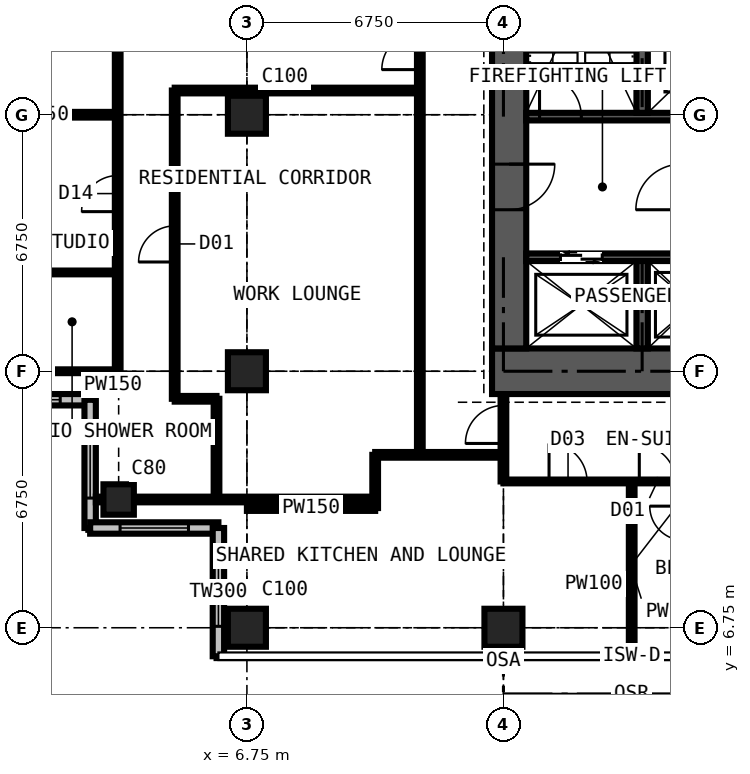
"""IFC4 building model, lengths in metres.
Left out: names, types, materials, properties, quantities, classifications, styles, units other than length and angle.
Written with IfcOpenShell. Run it as: python <this file> out.ifc"""

import sys

from ifc_helpers import new_model, si_unit, direction, frame, frame_2d, origin, origin_2d, place, context, subcontext, project, spatial, rectangle, extrude, element, fill, save


model = new_model("IFC4")
c1 = context("Model", 3, precision=1e-05, world=origin(), true_north=direction((0.0, 1.0)))
c2 = subcontext(c1, "Body", "Model", "MODEL_VIEW")
j1 = project(units=[si_unit("LENGTHUNIT", "METRE"), si_unit("PLANEANGLEUNIT", "RADIAN")], contexts=[c1])
p1 = place(None, origin())
s1 = spatial("IfcSite", under=j1, at=p1, CompositionType="ELEMENT")
p2 = place(p1, origin())
s2 = spatial("IfcBuilding", under=s1, at=p2, CompositionType="ELEMENT")
p3 = place(p2, frame((0.0, 0.0, 236.7)))
s3 = spatial("IfcBuildingStorey", under=s2, at=p3, CompositionType="ELEMENT", Elevation=236.7)
p4 = place(p3, frame((3.375, 10.125, 0.0), z_axis=(0.0, 0.0, 1.0), x_axis=(1.0, 0.0, 0.0)))
e1 = element("IfcColumn", 1, at=p4, inside=s3, PredefinedType="COLUMN", context=c2, shape_type="SweptSolid", body=[
    extrude(rectangle(XDim=0.8, YDim=0.8, at=origin_2d()), origin(), (0.0, 0.0, 1.0), 3.6),
])
for number, where, z_axis, x_axis in (
    (2, (6.75, 6.75, 0.0), (0.0, 0.0, 1.0), (1.0, 0.0, 0.0)),
    (3, (6.75, 13.5, 0.0), (0.0, 0.0, 1.0), (1.0, 0.0, 0.0)),
    (4, (6.75, 20.25, 0.0), (0.0, 0.0, 1.0), (1.0, 0.0, 0.0)),
    (5, (13.5, 6.75, 0.0), (0.0, 0.0, 1.0), (1.0, 0.0, 0.0)),
):
    element("IfcColumn", number, at=place(p3, frame(where, z_axis=z_axis, x_axis=x_axis)), inside=s3, PredefinedType="COLUMN", context=c2, shape_type="SweptSolid", body=[
        extrude(rectangle(XDim=1.0, YDim=1.0, at=origin_2d()), origin(), (0.0, 0.0, 1.0), 3.6),
    ])
p5 = place(p3, frame((13.2, 13.5, 0.0), z_axis=(0.0, 0.0, 1.0), x_axis=(1.0, 0.0, 0.0)))
e6 = element("IfcWall", 6, at=p5, inside=s3, PredefinedType="SHEAR", context=c2, shape_type="SweptSolid", body=[
    extrude(rectangle(XDim=14.1, YDim=1.2, at=frame_2d((7.05, 0.0))), origin(), (0.0, 0.0, 1.0), 3.6),
])
p6 = place(p3, frame((13.65, 26.4, 0.0), z_axis=(0.0, 0.0, 1.0), x_axis=(0.0, -1.0, 0.0)))
e7 = element("IfcWall", 7, at=p6, inside=s3, PredefinedType="SHEAR", context=c2, shape_type="SweptSolid", body=[
    extrude(rectangle(XDim=12.3, YDim=0.9, at=frame_2d((6.15, 0.0))), origin(), (0.0, 0.0, 1.0), 3.6),
])
p7 = place(p6, frame((7.45, 0.0, 0.0)))
e8 = element("IfcOpeningElement", 8, at=p7, cuts=e7, PredefinedType="OPENING", context=c2, shape_type="SweptSolid", body=[
    extrude(rectangle(XDim=1.2, YDim=2.2, at=frame_2d((0.6, 1.1))), frame((0.0, 0.46, 0.0), z_axis=(0.0, -1.0, 0.0), x_axis=(1.0, 0.0, 0.0)), (0.0, 0.0, 1.0), 0.92),
])
p8 = place(p3, frame((-0.75, 12.75, 0.0), z_axis=(0.0, 0.0, 1.0), x_axis=(1.0, 0.0, 0.0)))
e9 = element("IfcWall", 9, at=p8, inside=s3, PredefinedType="SOLIDWALL", context=c2, shape_type="SweptSolid", body=[
    extrude(rectangle(XDim=3.375, YDim=0.3, at=frame_2d((1.688, 0.0))), origin(), (0.0, 0.0, 1.0), 3.375),
])
p9 = place(p8, frame((0.788, 0.0, 0.6)))
e10 = element("IfcOpeningElement", 10, at=p9, cuts=e9, PredefinedType="OPENING", context=c2, shape_type="SweptSolid", body=[
    extrude(rectangle(XDim=1.8, YDim=2.1, at=frame_2d((0.9, 1.05))), frame((0.0, 0.16, 0.0), z_axis=(0.0, -1.0, 0.0), x_axis=(1.0, 0.0, 0.0)), (0.0, 0.0, 1.0), 0.32),
])
p10 = place(p3, frame((2.625, 12.75, 0.0), z_axis=(0.0, 0.0, 1.0), x_axis=(0.0, -1.0, 0.0)))
e11 = element("IfcWall", 11, at=p10, inside=s3, PredefinedType="SOLIDWALL", context=c2, shape_type="SweptSolid", body=[
    extrude(rectangle(XDim=3.375, YDim=0.3, at=frame_2d((1.688, 0.0))), origin(), (0.0, 0.0, 1.0), 3.375),
])
p11 = place(p10, frame((0.788, 0.0, 0.6)))
e12 = element("IfcOpeningElement", 12, at=p11, cuts=e11, PredefinedType="OPENING", context=c2, shape_type="SweptSolid", body=[
    extrude(rectangle(XDim=1.8, YDim=2.1, at=frame_2d((0.9, 1.05))), frame((0.0, 0.16, 0.0), z_axis=(0.0, -1.0, 0.0), x_axis=(1.0, 0.0, 0.0)), (0.0, 0.0, 1.0), 0.32),
])
p12 = place(p3, frame((2.625, 9.375, 0.0), z_axis=(0.0, 0.0, 1.0), x_axis=(1.0, 0.0, 0.0)))
e13 = element("IfcWall", 13, at=p12, inside=s3, PredefinedType="SOLIDWALL", context=c2, shape_type="SweptSolid", body=[
    extrude(rectangle(XDim=3.375, YDim=0.3, at=frame_2d((1.688, 0.0))), origin(), (0.0, 0.0, 1.0), 3.375),
])
p13 = place(p12, frame((0.788, 0.0, 0.6)))
e14 = element("IfcOpeningElement", 14, at=p13, cuts=e13, PredefinedType="OPENING", context=c2, shape_type="SweptSolid", body=[
    extrude(rectangle(XDim=1.8, YDim=2.1, at=frame_2d((0.9, 1.05))), frame((0.0, 0.16, 0.0), z_axis=(0.0, -1.0, 0.0), x_axis=(1.0, 0.0, 0.0)), (0.0, 0.0, 1.0), 0.32),
])
p14 = place(p3, frame((6.0, 9.375, 0.0), z_axis=(0.0, 0.0, 1.0), x_axis=(0.0, -1.0, 0.0)))
e15 = element("IfcWall", 15, at=p14, inside=s3, PredefinedType="SOLIDWALL", context=c2, shape_type="SweptSolid", body=[
    extrude(rectangle(XDim=3.375, YDim=0.3, at=frame_2d((1.688, 0.0))), origin(), (0.0, 0.0, 1.0), 3.375),
])
p15 = place(p14, frame((0.788, 0.0, 0.6)))
e16 = element("IfcOpeningElement", 16, at=p15, cuts=e15, PredefinedType="OPENING", context=c2, shape_type="SweptSolid", body=[
    extrude(rectangle(XDim=1.8, YDim=2.1, at=frame_2d((0.9, 1.05))), frame((0.0, 0.16, 0.0), z_axis=(0.0, -1.0, 0.0), x_axis=(1.0, 0.0, 0.0)), (0.0, 0.0, 1.0), 0.32),
])
p16 = place(p3, frame((14.1, 16.5, 0.0), z_axis=(0.0, 0.0, 1.0), x_axis=(1.0, 0.0, 0.0)))
e17 = element("IfcWall", 17, at=p16, inside=s3, PredefinedType="SHEAR", context=c2, shape_type="SweptSolid", body=[
    extrude(rectangle(XDim=12.3, YDim=0.2, at=frame_2d((6.15, 0.0))), origin(), (0.0, 0.0, 1.0), 3.6),
])
p17 = place(p16, frame((0.9, 0.0, 0.0)))
e18 = element("IfcOpeningElement", 18, at=p17, cuts=e17, PredefinedType="OPENING", context=c2, shape_type="SweptSolid", body=[
    extrude(rectangle(XDim=1.1, YDim=2.2, at=frame_2d((0.55, 1.1))), frame((0.0, 0.11, 0.0), z_axis=(0.0, -1.0, 0.0), x_axis=(1.0, 0.0, 0.0)), (0.0, 0.0, 1.0), 0.22),
])
p18 = place(p16, frame((4.31, 0.0, 0.0)))
e19 = element("IfcOpeningElement", 19, at=p18, cuts=e17, PredefinedType="OPENING", context=c2, shape_type="SweptSolid", body=[
    extrude(rectangle(XDim=1.1, YDim=2.2, at=frame_2d((0.55, 1.1))), frame((0.0, 0.11, 0.0), z_axis=(0.0, -1.0, 0.0), x_axis=(1.0, 0.0, 0.0)), (0.0, 0.0, 1.0), 0.22),
])
p19 = place(p16, frame((6.45, 0.0, 0.0)))
e20 = element("IfcOpeningElement", 20, at=p19, cuts=e17, PredefinedType="OPENING", context=c2, shape_type="SweptSolid", body=[
    extrude(rectangle(XDim=1.1, YDim=2.2, at=frame_2d((0.55, 1.1))), frame((0.0, 0.11, 0.0), z_axis=(0.0, -1.0, 0.0), x_axis=(1.0, 0.0, 0.0)), (0.0, 0.0, 1.0), 0.22),
])
p20 = place(p16, frame((9.5, 0.0, 0.0)))
e21 = element("IfcOpeningElement", 21, at=p20, cuts=e17, PredefinedType="OPENING", context=c2, shape_type="SweptSolid", body=[
    extrude(rectangle(XDim=1.1, YDim=2.2, at=frame_2d((0.55, 1.1))), frame((0.0, 0.11, 0.0), z_axis=(0.0, -1.0, 0.0), x_axis=(1.0, 0.0, 0.0)), (0.0, 0.0, 1.0), 0.22),
])
p21 = place(p3, frame((14.1, 20.2, 0.0), z_axis=(0.0, 0.0, 1.0), x_axis=(1.0, 0.0, 0.0)))
e22 = element("IfcWall", 22, at=p21, inside=s3, PredefinedType="SHEAR", context=c2, shape_type="SweptSolid", body=[
    extrude(rectangle(XDim=12.3, YDim=0.2, at=frame_2d((6.15, 0.0))), origin(), (0.0, 0.0, 1.0), 3.6),
])
p22 = place(p21, frame((4.56, 0.0, 0.0)))
e23 = element("IfcOpeningElement", 23, at=p22, cuts=e22, PredefinedType="OPENING", context=c2, shape_type="SweptSolid", body=[
    extrude(rectangle(XDim=1.1, YDim=2.2, at=frame_2d((0.55, 1.1))), frame((0.0, 0.11, 0.0), z_axis=(0.0, -1.0, 0.0), x_axis=(1.0, 0.0, 0.0)), (0.0, 0.0, 1.0), 0.22),
])
p23 = place(p21, frame((6.7, 0.0, 0.0)))
e24 = element("IfcOpeningElement", 24, at=p23, cuts=e22, PredefinedType="OPENING", context=c2, shape_type="SweptSolid", body=[
    extrude(rectangle(XDim=1.1, YDim=2.2, at=frame_2d((0.55, 1.1))), frame((0.0, 0.11, 0.0), z_axis=(0.0, -1.0, 0.0), x_axis=(1.0, 0.0, 0.0)), (0.0, 0.0, 1.0), 0.22),
])
p24 = place(p21, frame((0.35, 0.0, 0.0)))
e25 = element("IfcOpeningElement", 25, at=p24, cuts=e22, PredefinedType="OPENING", context=c2, shape_type="SweptSolid", body=[
    extrude(rectangle(XDim=1.1, YDim=2.2, at=frame_2d((0.55, 1.1))), frame((0.0, 0.11, 0.0), z_axis=(0.0, -1.0, 0.0), x_axis=(1.0, 0.0, 0.0)), (0.0, 0.0, 1.0), 0.22),
])
p25 = place(p21, frame((9.75, 0.0, 0.0)))
e26 = element("IfcOpeningElement", 26, at=p25, cuts=e22, PredefinedType="OPENING", context=c2, shape_type="SweptSolid", body=[
    extrude(rectangle(XDim=1.1, YDim=2.2, at=frame_2d((0.55, 1.1))), frame((0.0, 0.11, 0.0), z_axis=(0.0, -1.0, 0.0), x_axis=(1.0, 0.0, 0.0)), (0.0, 0.0, 1.0), 0.22),
])
p26 = place(p3, frame((17.15, 20.3, 0.0), z_axis=(0.0, 0.0, 1.0), x_axis=(0.0, 1.0, 0.0)))
e27 = element("IfcWall", 27, at=p26, inside=s3, PredefinedType="SHEAR", context=c2, shape_type="SweptSolid", body=[
    extrude(rectangle(XDim=6.1, YDim=0.3, at=frame_2d((3.05, 0.0))), origin(), (0.0, 0.0, 1.0), 3.6),
])
p27 = place(p3, frame((17.15, 14.1, 0.0), z_axis=(0.0, 0.0, 1.0), x_axis=(0.0, 1.0, 0.0)))
e28 = element("IfcWall", 28, at=p27, inside=s3, PredefinedType="SHEAR", context=c2, shape_type="SweptSolid", body=[
    extrude(rectangle(XDim=2.3, YDim=0.3, at=frame_2d((1.15, 0.0))), origin(), (0.0, 0.0, 1.0), 3.6),
])
p28 = place(p3, frame((-0.734, 13.5, 0.0), z_axis=(0.0, 0.0, 1.0), x_axis=(1.0, 0.0, 0.0)))
e29 = element("IfcWall", 29, at=p28, inside=s3, PredefinedType="PARTITIONING", context=c2, shape_type="SweptSolid", body=[
    extrude(rectangle(XDim=4.084, YDim=0.1, at=frame_2d((2.042, 0.0))), origin(), (0.0, 0.0, 1.0), 2.877),
])
p29 = place(p3, frame((-0.734, 20.25, 0.0), z_axis=(0.0, 0.0, 1.0), x_axis=(1.0, 0.0, 0.0)))
e30 = element("IfcWall", 30, at=p29, inside=s3, PredefinedType="PARTITIONING", context=c2, shape_type="SweptSolid", body=[
    extrude(rectangle(XDim=4.084, YDim=0.15, at=frame_2d((2.042, 0.0))), origin(), (0.0, 0.0, 1.0), 2.877),
])
p30 = place(p3, frame((0.95, 16.1, 0.0), z_axis=(0.0, 0.0, 1.0), x_axis=(1.0, 0.0, 0.0)))
e31 = element("IfcWall", 31, at=p30, inside=s3, PredefinedType="PARTITIONING", context=c2, shape_type="SweptSolid", body=[
    extrude(rectangle(XDim=2.4, YDim=0.1, at=frame_2d((1.2, 0.0))), origin(), (0.0, 0.0, 1.0), 3.375),
])
p31 = place(p3, frame((2.625, 12.766, 0.0), z_axis=(0.0, 0.0, 1.0), x_axis=(0.0, 1.0, 0.0)))
e32 = element("IfcWall", 32, at=p31, inside=s3, PredefinedType="PARTITIONING", context=c2, shape_type="SweptSolid", body=[
    extrude(rectangle(XDim=0.734, YDim=0.15, at=frame_2d((0.367, 0.0))), origin(), (0.0, 0.0, 1.0), 3.375),
])
p32 = place(p3, frame((2.775, 10.125, 0.0), z_axis=(0.0, 0.0, 1.0), x_axis=(1.0, 0.0, 0.0)))
e33 = element("IfcWall", 33, at=p32, inside=s3, PredefinedType="PARTITIONING", context=c2, shape_type="SweptSolid", body=[
    extrude(rectangle(XDim=7.35, YDim=0.15, at=frame_2d((3.675, 0.0))), origin(), (0.0, 0.0, 1.0), 2.877),
])
p33 = place(p3, frame((3.35, 13.5, 0.0), z_axis=(0.0, 0.0, 1.0), x_axis=(0.0, 1.0, 0.0)))
e34 = element("IfcWall", 34, at=p33, inside=s3, PredefinedType="PARTITIONING", context=c2, shape_type="SweptSolid", body=[
    extrude(rectangle(XDim=13.5, YDim=0.15, at=frame_2d((6.75, 0.0))), origin(), (0.0, 0.0, 1.0), 3.375),
])
p34 = place(p33, frame((4.2, 0.0, 0.0)))
e35 = element("IfcOpeningElement", 35, at=p34, cuts=e34, PredefinedType="OPENING", context=c2, shape_type="SweptSolid", body=[
    extrude(rectangle(XDim=0.95, YDim=2.2, at=frame_2d((0.475, 1.1))), frame((0.0, 0.085, 0.0), z_axis=(0.0, -1.0, 0.0), x_axis=(1.0, 0.0, 0.0)), (0.0, 0.0, 1.0), 0.17),
])
p35 = place(p3, frame((4.85, 12.775, 0.0), z_axis=(0.0, 0.0, 1.0), x_axis=(0.0, 1.0, 0.0)))
e36 = element("IfcWall", 36, at=p35, inside=s3, PredefinedType="PARTITIONING", context=c2, shape_type="SweptSolid", body=[
    extrude(rectangle(XDim=8.113, YDim=0.15, at=frame_2d((4.056, 0.0))), origin(), (0.0, 0.0, 1.0), 3.375),
])
p36 = place(p35, frame((3.6, 0.0, 0.0)))
e37 = element("IfcOpeningElement", 37, at=p36, cuts=e36, PredefinedType="OPENING", context=c2, shape_type="SweptSolid", body=[
    extrude(rectangle(XDim=0.95, YDim=2.2, at=frame_2d((0.475, 1.1))), frame((0.0, 0.085, 0.0), z_axis=(0.0, -1.0, 0.0), x_axis=(1.0, 0.0, 0.0)), (0.0, 0.0, 1.0), 0.17),
])
p37 = place(p3, frame((4.85, 12.775, 0.0), z_axis=(0.0, 0.0, 1.0), x_axis=(1.0, 0.0, 0.0)))
e38 = element("IfcWall", 38, at=p37, inside=s3, PredefinedType="PARTITIONING", context=c2, shape_type="SweptSolid", body=[
    extrude(rectangle(XDim=1.1, YDim=0.15, at=frame_2d((0.55, 0.0))), origin(), (0.0, 0.0, 1.0), 3.375),
])
p38 = place(p3, frame((4.85, 20.887, 0.0), z_axis=(0.0, 0.0, 1.0), x_axis=(1.0, 0.0, 0.0)))
e39 = element("IfcWall", 39, at=p38, inside=s3, PredefinedType="PARTITIONING", context=c2, shape_type="SweptSolid", body=[
    extrude(rectangle(XDim=6.45, YDim=0.15, at=frame_2d((3.225, 0.0))), origin(), (0.0, 0.0, 1.0), 3.375),
])
p39 = place(p3, frame((5.95, 10.125, 0.0), z_axis=(0.0, 0.0, 1.0), x_axis=(0.0, 1.0, 0.0)))
e40 = element("IfcWall", 40, at=p39, inside=s3, PredefinedType="PARTITIONING", context=c2, shape_type="SweptSolid", body=[
    extrude(rectangle(XDim=2.65, YDim=0.15, at=frame_2d((1.325, 0.0))), origin(), (0.0, 0.0, 1.0), 3.375),
])
p40 = place(p3, frame((6.75, 9.9, 0.0), z_axis=(0.0, 0.0, 1.0), x_axis=(1.0, 0.0, 0.0)))
e41 = element("IfcWall", 41, at=p40, inside=s3, PredefinedType="PARTITIONING", context=c2, shape_type="SweptSolid", body=[
    extrude(rectangle(XDim=3.375, YDim=0.15, at=frame_2d((1.688, 0.0))), origin(), (0.0, 0.0, 1.0), 3.375),
])
p41 = place(p3, frame((10.125, 9.9, 0.0), z_axis=(0.0, 0.0, 1.0), x_axis=(0.0, 1.0, 0.0)))
e42 = element("IfcWall", 42, at=p41, inside=s3, PredefinedType="PARTITIONING", context=c2, shape_type="SweptSolid", body=[
    extrude(rectangle(XDim=1.4, YDim=0.15, at=frame_2d((0.7, 0.0))), origin(), (0.0, 0.0, 1.0), 3.375),
])
p42 = place(p3, frame((10.125, 11.3, 0.0), z_axis=(0.0, 0.0, 1.0), x_axis=(1.0, 0.0, 0.0)))
e43 = element("IfcWall", 43, at=p42, inside=s3, PredefinedType="PARTITIONING", context=c2, shape_type="SweptSolid", body=[
    extrude(rectangle(XDim=3.375, YDim=0.15, at=frame_2d((1.688, 0.0))), origin(), (0.0, 0.0, 1.0), 3.375),
])
p43 = place(p3, frame((11.3, 11.3, 0.0), z_axis=(0.0, 0.0, 1.0), x_axis=(0.0, 1.0, 0.0)))
e44 = element("IfcWall", 44, at=p43, inside=s3, PredefinedType="PARTITIONING", context=c2, shape_type="SweptSolid", body=[
    extrude(rectangle(XDim=19.3, YDim=0.15, at=frame_2d((9.65, 0.0))), origin(), (0.0, 0.0, 1.0), 3.375),
])
p44 = place(p43, frame((18.1, 0.0, 0.0)))
e45 = element("IfcOpeningElement", 45, at=p44, cuts=e44, PredefinedType="OPENING", context=c2, shape_type="SweptSolid", body=[
    extrude(rectangle(XDim=1.0, YDim=2.2, at=frame_2d((0.5, 1.1))), frame((0.0, 0.085, 0.0), z_axis=(0.0, -1.0, 0.0), x_axis=(1.0, 0.0, 0.0)), (0.0, 0.0, 1.0), 0.17),
])
p45 = place(p43, frame((10.137, 0.0, 0.0)))
e46 = element("IfcOpeningElement", 46, at=p45, cuts=e44, PredefinedType="OPENING", context=c2, shape_type="SweptSolid", body=[
    extrude(rectangle(XDim=1.0, YDim=2.2, at=frame_2d((0.5, 1.1))), frame((0.0, 0.085, 0.0), z_axis=(0.0, -1.0, 0.0), x_axis=(1.0, 0.0, 0.0)), (0.0, 0.0, 1.0), 0.17),
])
p46 = place(p3, frame((13.5, 10.6, 0.0), z_axis=(0.0, 0.0, 1.0), x_axis=(0.0, 1.0, 0.0)))
e47 = element("IfcWall", 47, at=p46, inside=s3, PredefinedType="PARTITIONING", context=c2, shape_type="SweptSolid", body=[
    extrude(rectangle(XDim=2.3, YDim=0.15, at=frame_2d((1.15, 0.0))), origin(), (0.0, 0.0, 1.0), 2.877),
])
p47 = place(p46, frame((1.0, 0.0, 0.0)))
e48 = element("IfcOpeningElement", 48, at=p47, cuts=e47, PredefinedType="OPENING", context=c2, shape_type="SweptSolid", body=[
    extrude(rectangle(XDim=1.0, YDim=2.2, at=frame_2d((0.5, 1.1))), frame((0.0, 0.085, 0.0), z_axis=(0.0, -1.0, 0.0), x_axis=(1.0, 0.0, 0.0)), (0.0, 0.0, 1.0), 0.17),
])
p48 = place(p3, frame((13.5, 10.6, 0.0), z_axis=(0.0, 0.0, 1.0), x_axis=(1.0, 0.0, 0.0)))
e49 = element("IfcWall", 49, at=p48, inside=s3, PredefinedType="PARTITIONING", context=c2, shape_type="SweptSolid", body=[
    extrude(rectangle(XDim=10.125, YDim=0.1, at=frame_2d((5.062, 0.0))), origin(), (0.0, 0.0, 1.0), 3.375),
])
p49 = place(p48, frame((1.2, 0.0, 0.0)))
e50 = element("IfcOpeningElement", 50, at=p49, cuts=e49, PredefinedType="OPENING", context=c2, shape_type="SweptSolid", body=[
    extrude(rectangle(XDim=1.0, YDim=2.2, at=frame_2d((0.5, 1.1))), frame((0.0, 0.06, 0.0), z_axis=(0.0, -1.0, 0.0), x_axis=(1.0, 0.0, 0.0)), (0.0, 0.0, 1.0), 0.12),
])
p50 = place(p48, frame((3.575, 0.0, 0.0)))
e51 = element("IfcOpeningElement", 51, at=p50, cuts=e49, PredefinedType="OPENING", context=c2, shape_type="SweptSolid", body=[
    extrude(rectangle(XDim=0.95, YDim=2.2, at=frame_2d((0.475, 1.1))), frame((0.0, 0.06, 0.0), z_axis=(0.0, -1.0, 0.0), x_axis=(1.0, 0.0, 0.0)), (0.0, 0.0, 1.0), 0.12),
])
p51 = place(p48, frame((6.95, 0.0, 0.0)))
e52 = element("IfcOpeningElement", 52, at=p51, cuts=e49, PredefinedType="OPENING", context=c2, shape_type="SweptSolid", body=[
    extrude(rectangle(XDim=0.95, YDim=2.2, at=frame_2d((0.475, 1.1))), frame((0.0, 0.06, 0.0), z_axis=(0.0, -1.0, 0.0), x_axis=(1.0, 0.0, 0.0)), (0.0, 0.0, 1.0), 0.12),
])
p52 = place(p3, frame((16.875, 6.016, 0.0), z_axis=(0.0, 0.0, 1.0), x_axis=(0.0, 1.0, 0.0)))
e53 = element("IfcWall", 53, at=p52, inside=s3, PredefinedType="PARTITIONING", context=c2, shape_type="SweptSolid", body=[
    extrude(rectangle(XDim=4.584, YDim=0.15, at=frame_2d((2.292, 0.0))), origin(), (0.0, 0.0, 1.0), 3.375),
])
p53 = place(p9, origin())
e54 = element("IfcWindow", 54, at=p53, inside=s3, PartitioningType="SINGLE_PANEL", PredefinedType="WINDOW", context=c2, shape_type="SweptSolid", body=[
    extrude(rectangle(XDim=1.8, YDim=2.1, at=frame_2d((0.9, 1.05))), frame((0.0, 0.03, 0.0), z_axis=(0.0, -1.0, 0.0), x_axis=(1.0, 0.0, 0.0)), (0.0, 0.0, 1.0), 0.06),
])
fill(e10, e54)
p54 = place(p11, origin())
e55 = element("IfcWindow", 55, at=p54, inside=s3, PartitioningType="SINGLE_PANEL", PredefinedType="WINDOW", context=c2, shape_type="SweptSolid", body=[
    extrude(rectangle(XDim=1.8, YDim=2.1, at=frame_2d((0.9, 1.05))), frame((0.0, 0.03, 0.0), z_axis=(0.0, -1.0, 0.0), x_axis=(1.0, 0.0, 0.0)), (0.0, 0.0, 1.0), 0.06),
])
fill(e12, e55)
p55 = place(p13, origin())
e56 = element("IfcWindow", 56, at=p55, inside=s3, PartitioningType="SINGLE_PANEL", PredefinedType="WINDOW", context=c2, shape_type="SweptSolid", body=[
    extrude(rectangle(XDim=1.8, YDim=2.1, at=frame_2d((0.9, 1.05))), frame((0.0, 0.03, 0.0), z_axis=(0.0, -1.0, 0.0), x_axis=(1.0, 0.0, 0.0)), (0.0, 0.0, 1.0), 0.06),
])
fill(e14, e56)
p56 = place(p15, origin())
e57 = element("IfcWindow", 57, at=p56, inside=s3, PartitioningType="SINGLE_PANEL", PredefinedType="WINDOW", context=c2, shape_type="SweptSolid", body=[
    extrude(rectangle(XDim=1.8, YDim=2.1, at=frame_2d((0.9, 1.05))), frame((0.0, 0.03, 0.0), z_axis=(0.0, -1.0, 0.0), x_axis=(1.0, 0.0, 0.0)), (0.0, 0.0, 1.0), 0.06),
])
fill(e16, e57)
p57 = place(p17, origin())
e58 = element("IfcDoor", 58, at=p57, inside=s3, OperationType="DOUBLE_DOOR_SLIDING", PredefinedType="DOOR", context=c2, shape_type="SweptSolid", body=[
    extrude(rectangle(XDim=1.1, YDim=2.2, at=frame_2d((0.55, 1.1))), frame((0.0, 0.025, 0.0), z_axis=(0.0, -1.0, 0.0), x_axis=(1.0, 0.0, 0.0)), (0.0, 0.0, 1.0), 0.05),
])
fill(e18, e58)
p58 = place(p7, origin())
e59 = element("IfcDoor", 59, at=p58, inside=s3, OperationType="DOUBLE_DOOR_SINGLE_SWING", PredefinedType="DOOR", context=c2, shape_type="SweptSolid", body=[
    extrude(rectangle(XDim=1.2, YDim=2.2, at=frame_2d((0.6, 1.1))), frame((0.0, 0.025, 0.0), z_axis=(0.0, -1.0, 0.0), x_axis=(1.0, 0.0, 0.0)), (0.0, 0.0, 1.0), 0.05),
])
fill(e8, e59)
p59 = place(p24, origin())
e60 = element("IfcDoor", 60, at=p59, inside=s3, OperationType="SINGLE_SWING_LEFT", PredefinedType="DOOR", context=c2, shape_type="SweptSolid", body=[
    extrude(rectangle(XDim=1.1, YDim=2.2, at=frame_2d((0.55, 1.1))), frame((0.0, 0.025, 0.0), z_axis=(0.0, -1.0, 0.0), x_axis=(1.0, 0.0, 0.0)), (0.0, 0.0, 1.0), 0.05),
])
fill(e25, e60)
p60 = place(p49, origin())
e61 = element("IfcDoor", 61, at=p60, inside=s3, OperationType="SINGLE_SWING_LEFT", PredefinedType="DOOR", context=c2, shape_type="SweptSolid", body=[
    extrude(rectangle(XDim=1.0, YDim=2.2, at=frame_2d((0.5, 1.1))), frame((0.0, 0.025, 0.0), z_axis=(0.0, -1.0, 0.0), x_axis=(1.0, 0.0, 0.0)), (0.0, 0.0, 1.0), 0.05),
])
fill(e50, e61)
p61 = place(p50, origin())
e62 = element("IfcDoor", 62, at=p61, inside=s3, OperationType="SINGLE_SWING_LEFT", PredefinedType="DOOR", context=c2, shape_type="SweptSolid", body=[
    extrude(rectangle(XDim=0.95, YDim=2.2, at=frame_2d((0.475, 1.1))), frame((0.0, 0.025, 0.0), z_axis=(0.0, -1.0, 0.0), x_axis=(1.0, 0.0, 0.0)), (0.0, 0.0, 1.0), 0.05),
])
fill(e51, e62)
p62 = place(p47, origin())
e63 = element("IfcDoor", 63, at=p62, inside=s3, OperationType="SINGLE_SWING_LEFT", PredefinedType="DOOR", context=c2, shape_type="SweptSolid", body=[
    extrude(rectangle(XDim=1.0, YDim=2.2, at=frame_2d((0.5, 1.1))), frame((0.0, 0.025, 0.0), z_axis=(0.0, -1.0, 0.0), x_axis=(1.0, 0.0, 0.0)), (0.0, 0.0, 1.0), 0.05),
])
fill(e48, e63)
p63 = place(p34, origin())
e64 = element("IfcDoor", 64, at=p63, inside=s3, OperationType="SINGLE_SWING_LEFT", PredefinedType="DOOR", context=c2, shape_type="SweptSolid", body=[
    extrude(rectangle(XDim=0.95, YDim=2.2, at=frame_2d((0.475, 1.1))), frame((0.0, 0.025, 0.0), z_axis=(0.0, -1.0, 0.0), x_axis=(1.0, 0.0, 0.0)), (0.0, 0.0, 1.0), 0.05),
])
fill(e35, e64)
p64 = place(p45, origin())
e65 = element("IfcDoor", 65, at=p64, inside=s3, OperationType="SINGLE_SWING_LEFT", PredefinedType="DOOR", context=c2, shape_type="SweptSolid", body=[
    extrude(rectangle(XDim=1.0, YDim=2.2, at=frame_2d((0.5, 1.1))), frame((0.0, 0.025, 0.0), z_axis=(0.0, -1.0, 0.0), x_axis=(1.0, 0.0, 0.0)), (0.0, 0.0, 1.0), 0.05),
])
fill(e46, e65)
p65 = place(p36, origin())
e66 = element("IfcDoor", 66, at=p65, inside=s3, OperationType="SINGLE_SWING_LEFT", PredefinedType="DOOR", context=c2, shape_type="SweptSolid", body=[
    extrude(rectangle(XDim=0.95, YDim=2.2, at=frame_2d((0.475, 1.1))), frame((0.0, 0.025, 0.0), z_axis=(0.0, -1.0, 0.0), x_axis=(1.0, 0.0, 0.0)), (0.0, 0.0, 1.0), 0.05),
])
fill(e37, e66)
save(model, sys.argv[1])
